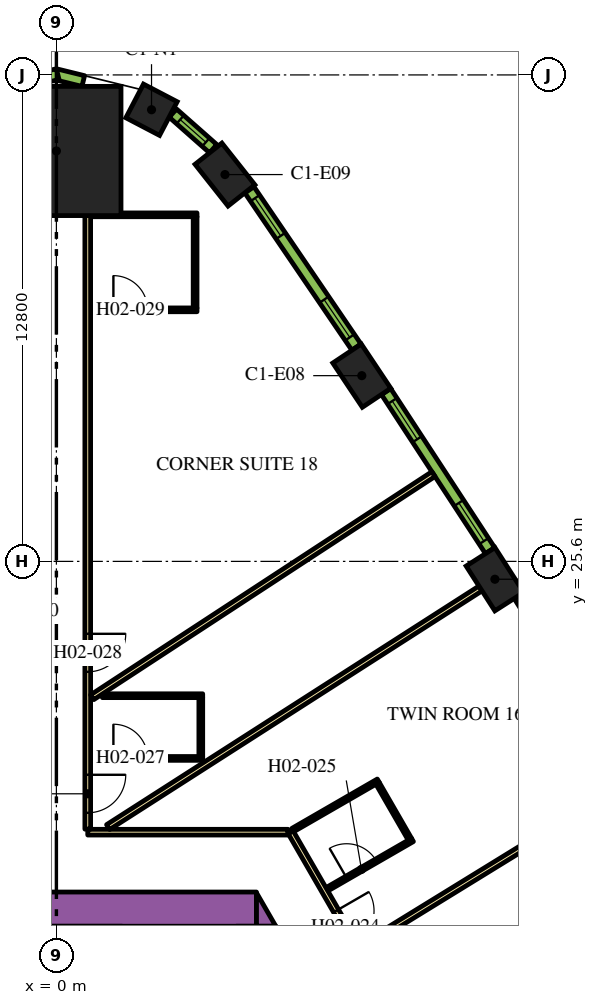
"""IFC4 building model, lengths in metres.
Left out: names, types, materials, properties, quantities, classifications, styles, units other than length and angle.
Written with IfcOpenShell. Run it as: python <this file> out.ifc"""

import sys

from ifc_helpers import new_model, si_unit, direction, frame, frame_2d, origin, origin_2d, place, context, subcontext, project, spatial, polyline, rectangle, outline, extrude, element, fill, save


model = new_model("IFC4")
c1 = context("Model", 3, precision=1e-05, world=origin(), true_north=direction((0.0, 1.0)))
c2 = subcontext(c1, "Body", "Model", "MODEL_VIEW")
j1 = project(units=[si_unit("LENGTHUNIT", "METRE"), si_unit("PLANEANGLEUNIT", "RADIAN")], contexts=[c1])
p1 = place(None, origin())
s1 = spatial("IfcSite", under=j1, at=p1, CompositionType="ELEMENT")
p2 = place(p1, origin())
s2 = spatial("IfcBuilding", under=s1, at=p2, CompositionType="ELEMENT")
p3 = place(p2, frame((0.0, 0.0, 39.3)))
s3 = spatial("IfcBuildingStorey", under=s2, at=p3, CompositionType="ELEMENT", Elevation=39.3)
p4 = place(p3, frame((0.0, 36.399, 0.0), z_axis=(0.0, 0.0, 1.0), x_axis=(0.0, 1.0, 0.0)))
e1 = element("IfcColumn", 1, at=p4, inside=s3, PredefinedType="COLUMN", context=c2, shape_type="SweptSolid", body=[
    extrude(rectangle(XDim=3.4, YDim=3.4, at=origin_2d()), origin(), (0.0, 0.0, 1.0), 3.9),
])
for number, where, z_axis, x_axis in (
    (2, (11.539, 25.131, 0.0), (0.0, 0.0, 1.0), (-0.539, 0.842, 0.0)),
    (3, (8.037, 30.487, 0.0), (0.0, 0.0, 1.0), (-0.555, 0.832, 0.0)),
    (4, (4.436, 35.778, 0.0), (0.0, 0.0, 1.0), (-0.62, 0.784, 0.0)),
):
    element("IfcColumn", number, at=place(p3, frame(where, z_axis=z_axis, x_axis=x_axis)), inside=s3, PredefinedType="COLUMN", context=c2, shape_type="SweptSolid", body=[
        extrude(rectangle(XDim=1.4, YDim=0.9, at=origin_2d()), origin(), (0.0, 0.0, 1.0), 3.9),
    ])
p5 = place(p3, frame((2.503, 37.484, 0.0), z_axis=(0.0, 0.0, 1.0), x_axis=(-0.886067695645, 0.463555863661, 0.0)))
e5 = element("IfcColumn", 5, at=p5, inside=s3, PredefinedType="COLUMN", context=c2, shape_type="SweptSolid", body=[
    extrude(rectangle(XDim=1.0, YDim=1.0, at=origin_2d()), origin(), (0.0, 0.0, 1.0), 3.9),
])
p6 = place(p3, frame((-4.224, 16.45, 0.0), z_axis=(0.0, 0.0, 1.0), x_axis=(1.0, 0.0, 0.0)))
e6 = element("IfcWall", 6, at=p6, inside=s3, PredefinedType="SOLIDWALL", context=c2, shape_type="SweptSolid", body=[
    extrude(rectangle(XDim=9.488, YDim=0.9, at=frame_2d((4.744, 0.0))), origin(), (0.0, 0.0, 1.0), 3.9),
])
p7 = place(p3, origin())
e7 = element("IfcWall", 7, at=p7, inside=s3, PredefinedType="SOLIDWALL", context=c2, shape_type="SweptSolid", body=[
    extrude(outline(polyline([(5.265, 16.0), (5.265, 16.88), (5.773, 16.0), (5.265, 16.0)])), origin(), (0.0, 0.0, 1.0), 3.9),
])
p8 = place(p3, frame((6.163, 18.475, 0.0), z_axis=(0.0, 0.0, 1.0), x_axis=(0.500001317485, -0.866024643133, 0.0)))
e8 = element("IfcWall", 8, at=p8, inside=s3, PredefinedType="PARTITIONING", context=c2, shape_type="SweptSolid", body=[
    extrude(rectangle(XDim=25.767, YDim=0.15, at=frame_2d((12.883, 0.0))), origin(), (0.0, 0.0, 1.0), 2.75),
])
p9 = place(p8, frame((24.586, 0.0, 0.0)))
e9 = element("IfcOpeningElement", 9, at=p9, cuts=e8, PredefinedType="OPENING", context=c2, shape_type="SweptSolid", body=[
    extrude(rectangle(XDim=1.0, YDim=2.1, at=frame_2d((0.5, 1.05))), frame((0.0, 0.085, 0.0), z_axis=(0.0, -1.0, 0.0), x_axis=(1.0, 0.0, 0.0)), (0.0, 0.0, 1.0), 0.17),
])
p10 = place(p8, frame((16.196, 0.0, 0.0)))
e10 = element("IfcOpeningElement", 10, at=p10, cuts=e8, PredefinedType="OPENING", context=c2, shape_type="SweptSolid", body=[
    extrude(rectangle(XDim=1.0, YDim=2.1, at=frame_2d((0.5, 1.05))), frame((0.0, 0.085, 0.0), z_axis=(0.0, -1.0, 0.0), x_axis=(1.0, 0.0, 0.0)), (0.0, 0.0, 1.0), 0.17),
])
p11 = place(p8, frame((14.789, 0.0, 0.0)))
e11 = element("IfcOpeningElement", 11, at=p11, cuts=e8, PredefinedType="OPENING", context=c2, shape_type="SweptSolid", body=[
    extrude(rectangle(XDim=1.1, YDim=2.1, at=frame_2d((0.55, 1.05))), frame((0.0, 0.085, 0.0), z_axis=(0.0, -1.0, 0.0), x_axis=(1.0, 0.0, 0.0)), (0.0, 0.0, 1.0), 0.17),
])
p12 = place(p8, frame((3.698, 0.0, 0.0)))
e12 = element("IfcOpeningElement", 12, at=p12, cuts=e8, PredefinedType="OPENING", context=c2, shape_type="SweptSolid", body=[
    extrude(rectangle(XDim=1.0, YDim=2.1, at=frame_2d((0.5, 1.05))), frame((0.0, 0.085, 0.0), z_axis=(0.0, -1.0, 0.0), x_axis=(1.0, 0.0, 0.0)), (0.0, 0.0, 1.0), 0.17),
])
p13 = place(p8, frame((2.391, 0.0, 0.0)))
e13 = element("IfcOpeningElement", 13, at=p13, cuts=e8, PredefinedType="OPENING", context=c2, shape_type="SweptSolid", body=[
    extrude(rectangle(XDim=1.0, YDim=2.1, at=frame_2d((0.5, 1.05))), frame((0.0, 0.085, 0.0), z_axis=(0.0, -1.0, 0.0), x_axis=(1.0, 0.0, 0.0)), (0.0, 0.0, 1.0), 0.17),
])
p14 = place(p3, frame((0.825, 18.475, 0.0), z_axis=(0.0, 0.0, 1.0), x_axis=(1.0, 0.0, 0.0)))
e14 = element("IfcWall", 14, at=p14, inside=s3, PredefinedType="PARTITIONING", context=c2, shape_type="SweptSolid", body=[
    extrude(rectangle(XDim=5.268, YDim=0.15, at=frame_2d((2.634, 0.0))), origin(), (0.0, 0.0, 1.0), 2.75),
])
p15 = place(p3, frame((0.825, 34.699, 0.0), z_axis=(0.0, 0.0, 1.0), x_axis=(0.0, -1.0, 0.0)))
e15 = element("IfcWall", 15, at=p15, inside=s3, PredefinedType="PARTITIONING", context=c2, shape_type="SweptSolid", body=[
    extrude(rectangle(XDim=16.144, YDim=0.15, at=frame_2d((8.072, 0.0))), origin(), (0.0, 0.0, 1.0), 2.75),
])
p16 = place(p15, frame((14.714, 0.0, 0.0)))
e16 = element("IfcOpeningElement", 16, at=p16, cuts=e15, PredefinedType="OPENING", context=c2, shape_type="SweptSolid", body=[
    extrude(rectangle(XDim=1.0, YDim=2.1, at=frame_2d((0.5, 1.05))), frame((0.0, 0.085, 0.0), z_axis=(0.0, -1.0, 0.0), x_axis=(1.0, 0.0, 0.0)), (0.0, 0.0, 1.0), 0.17),
])
p17 = place(p15, frame((11.005, 0.0, 0.0)))
e17 = element("IfcOpeningElement", 17, at=p17, cuts=e15, PredefinedType="OPENING", context=c2, shape_type="SweptSolid", body=[
    extrude(rectangle(XDim=1.0, YDim=2.1, at=frame_2d((0.5, 1.05))), frame((0.0, 0.085, 0.0), z_axis=(0.0, -1.0, 0.0), x_axis=(1.0, 0.0, 0.0)), (0.0, 0.0, 1.0), 0.17),
])
p18 = place(p3, frame((9.922, 27.896, 0.0), z_axis=(0.0, 0.0, 1.0), x_axis=(-0.836970816595, -0.547247523675, 0.0)))
e18 = element("IfcWall", 18, at=p18, inside=s3, PredefinedType="PARTITIONING", context=c2, shape_type="SweptSolid", body=[
    extrude(rectangle(XDim=10.729, YDim=0.15, at=frame_2d((5.364, 0.0))), origin(), (0.0, 0.0, 1.0), 2.75),
])
p19 = place(p3, frame((11.16, 24.888, 0.0), z_axis=(0.0, 0.0, 1.0), x_axis=(-0.84199813156, -0.539480441211, 0.0)))
e19 = element("IfcWall", 19, at=p19, inside=s3, PredefinedType="PARTITIONING", context=c2, shape_type="SweptSolid", body=[
    extrude(rectangle(XDim=11.638, YDim=0.15, at=frame_2d((5.819, 0.0))), origin(), (0.0, 0.0, 1.0), 2.75),
])
p20 = place(p3, frame((14.558, 19.475, 0.0), z_axis=(0.0, 0.0, 1.0), x_axis=(-0.851829455142, -0.523819223925, 0.0)))
e20 = element("IfcWall", 20, at=p20, inside=s3, PredefinedType="PARTITIONING", context=c2, shape_type="SweptSolid", body=[
    extrude(rectangle(XDim=7.688, YDim=0.15, at=frame_2d((3.844, 0.0))), origin(), (0.0, 0.0, 1.0), 2.75),
])
p21 = place(p3, frame((7.118, 16.971, 0.0), z_axis=(0.0, 0.0, 1.0), x_axis=(0.866021400173, 0.500006934395, 0.0)))
e21 = element("IfcWall", 21, at=p21, inside=s3, PredefinedType="PARTITIONING", context=c2, shape_type="SweptSolid", body=[
    extrude(rectangle(XDim=2.6, YDim=0.1, at=frame_2d((1.3, 0.0))), origin(), (0.0, 0.0, 1.0), 2.75),
])
p22 = place(p21, frame((0.6, 0.0, 0.0)))
e22 = element("IfcOpeningElement", 22, at=p22, cuts=e21, PredefinedType="OPENING", context=c2, shape_type="SweptSolid", body=[
    extrude(rectangle(XDim=0.9, YDim=2.1, at=frame_2d((0.45, 1.05))), frame((0.0, 0.06, 0.0), z_axis=(0.0, -1.0, 0.0), x_axis=(1.0, 0.0, 0.0)), (0.0, 0.0, 1.0), 0.12),
])
p23 = place(p3, frame((9.302, 18.289, 0.0), z_axis=(0.0, 0.0, 1.0), x_axis=(-0.500062241894, 0.865989465428, 0.0)))
e23 = element("IfcWall", 23, at=p23, inside=s3, PredefinedType="PARTITIONING", context=c2, shape_type="SweptSolid", body=[
    extrude(rectangle(XDim=1.7, YDim=0.1, at=frame_2d((0.85, 0.0))), origin(), (0.0, 0.0, 1.0), 2.75),
])
p24 = place(p3, frame((6.218, 18.53, 0.0), z_axis=(0.0, 0.0, 1.0), x_axis=(0.865997922154, 0.500047596559, 0.0)))
e24 = element("IfcWall", 24, at=p24, inside=s3, PredefinedType="PARTITIONING", context=c2, shape_type="SweptSolid", body=[
    extrude(rectangle(XDim=2.6, YDim=0.1, at=frame_2d((1.3, 0.0))), origin(), (0.0, 0.0, 1.0), 2.75),
])
p25 = place(p3, frame((0.9, 20.416, 0.0), z_axis=(0.0, 0.0, 1.0), x_axis=(1.0, 0.0, 0.0)))
e25 = element("IfcWall", 25, at=p25, inside=s3, PredefinedType="PARTITIONING", context=c2, shape_type="SweptSolid", body=[
    extrude(rectangle(XDim=2.95, YDim=0.1, at=frame_2d((1.475, 0.0))), origin(), (0.0, 0.0, 1.0), 2.75),
])
p26 = place(p25, frame((0.6, 0.0, 0.0)))
e26 = element("IfcOpeningElement", 26, at=p26, cuts=e25, PredefinedType="OPENING", context=c2, shape_type="SweptSolid", body=[
    extrude(rectangle(XDim=0.9, YDim=2.1, at=frame_2d((0.45, 1.05))), frame((0.0, 0.06, 0.0), z_axis=(0.0, -1.0, 0.0), x_axis=(1.0, 0.0, 0.0)), (0.0, 0.0, 1.0), 0.12),
])
p27 = place(p3, frame((3.8, 20.466, 0.0), z_axis=(0.0, 0.0, 1.0), x_axis=(0.0, 1.0, 0.0)))
e27 = element("IfcWall", 27, at=p27, inside=s3, PredefinedType="PARTITIONING", context=c2, shape_type="SweptSolid", body=[
    extrude(rectangle(XDim=1.55, YDim=0.1, at=frame_2d((0.775, 0.0))), origin(), (0.0, 0.0, 1.0), 2.75),
])
p28 = place(p3, frame((1.21, 22.066, 0.0), z_axis=(0.0, 0.0, 1.0), x_axis=(1.0, 0.0, 0.0)))
e28 = element("IfcWall", 28, at=p28, inside=s3, PredefinedType="PARTITIONING", context=c2, shape_type="SweptSolid", body=[
    extrude(rectangle(XDim=2.64, YDim=0.1, at=frame_2d((1.32, 0.0))), origin(), (0.0, 0.0, 1.0), 2.75),
])
p29 = place(p3, frame((0.9, 32.219, 0.0), z_axis=(0.0, 0.0, 1.0), x_axis=(1.0, 0.0, 0.0)))
e29 = element("IfcWall", 29, at=p29, inside=s3, PredefinedType="PARTITIONING", context=c2, shape_type="SweptSolid", body=[
    extrude(rectangle(XDim=2.8, YDim=0.1, at=frame_2d((1.4, 0.0))), origin(), (0.0, 0.0, 1.0), 2.75),
])
p30 = place(p29, frame((0.6, 0.0, 0.0)))
e30 = element("IfcOpeningElement", 30, at=p30, cuts=e29, PredefinedType="OPENING", context=c2, shape_type="SweptSolid", body=[
    extrude(rectangle(XDim=0.9, YDim=2.1, at=frame_2d((0.45, 1.05))), frame((0.0, 0.06, 0.0), z_axis=(0.0, -1.0, 0.0), x_axis=(1.0, 0.0, 0.0)), (0.0, 0.0, 1.0), 0.12),
])
p31 = place(p3, frame((3.65, 32.269, 0.0), z_axis=(0.0, 0.0, 1.0), x_axis=(0.0, 1.0, 0.0)))
e31 = element("IfcWall", 31, at=p31, inside=s3, PredefinedType="PARTITIONING", context=c2, shape_type="SweptSolid", body=[
    extrude(rectangle(XDim=2.4, YDim=0.1, at=frame_2d((1.2, 0.0))), origin(), (0.0, 0.0, 1.0), 2.75),
])
p32 = place(p3, frame((0.9, 34.719, 0.0), z_axis=(0.0, 0.0, 1.0), x_axis=(1.0, 0.0, 0.0)))
e32 = element("IfcWall", 32, at=p32, inside=s3, PredefinedType="PARTITIONING", context=c2, shape_type="SweptSolid", body=[
    extrude(rectangle(XDim=2.8, YDim=0.1, at=frame_2d((1.4, 0.0))), origin(), (0.0, 0.0, 1.0), 2.75),
])
p33 = place(p3, frame((14.827, 20.466, 0.0), z_axis=(0.0, 0.0, 1.0), x_axis=(-0.531688286542, 0.846940119462, 0.0)))
e33 = element("IfcWall", 33, at=p33, inside=s3, PredefinedType="SOLIDWALL", context=c2, shape_type="SweptSolid", body=[
    extrude(rectangle(XDim=4.998, YDim=0.29, at=frame_2d((2.499, 0.0))), origin(), (0.0, 0.0, 1.0), 3.65),
])
p34 = place(p33, frame((0.297, 0.0, 0.9)))
e34 = element("IfcOpeningElement", 34, at=p34, cuts=e33, PredefinedType="OPENING", context=c2, shape_type="SweptSolid", body=[
    extrude(rectangle(XDim=1.2, YDim=2.15, at=frame_2d((0.6, 1.075))), frame((0.0, 0.155, 0.0), z_axis=(0.0, -1.0, 0.0), x_axis=(1.0, 0.0, 0.0)), (0.0, 0.0, 1.0), 0.31),
])
p35 = place(p33, frame((3.501, 0.0, 0.9)))
e35 = element("IfcOpeningElement", 35, at=p35, cuts=e33, PredefinedType="OPENING", context=c2, shape_type="SweptSolid", body=[
    extrude(rectangle(XDim=1.2, YDim=2.15, at=frame_2d((0.6, 1.075))), frame((0.0, 0.155, 0.0), z_axis=(0.0, -1.0, 0.0), x_axis=(1.0, 0.0, 0.0)), (0.0, 0.0, 1.0), 0.31),
])
p36 = place(p3, frame((11.411, 25.884, 0.0), z_axis=(0.0, 0.0, 1.0), x_axis=(-0.547204617628, 0.836998868845, 0.0)))
e36 = element("IfcWall", 36, at=p36, inside=s3, PredefinedType="SOLIDWALL", context=c2, shape_type="SweptSolid", body=[
    extrude(rectangle(XDim=4.998, YDim=0.29, at=frame_2d((2.499, 0.0))), origin(), (0.0, 0.0, 1.0), 3.65),
])
p37 = place(p36, frame((0.297, 0.0, 0.9)))
e37 = element("IfcOpeningElement", 37, at=p37, cuts=e36, PredefinedType="OPENING", context=c2, shape_type="SweptSolid", body=[
    extrude(rectangle(XDim=1.2, YDim=2.15, at=frame_2d((0.6, 1.075))), frame((0.0, 0.155, 0.0), z_axis=(0.0, -1.0, 0.0), x_axis=(1.0, 0.0, 0.0)), (0.0, 0.0, 1.0), 0.31),
])
p38 = place(p36, frame((3.501, 0.0, 0.9)))
e38 = element("IfcOpeningElement", 38, at=p38, cuts=e36, PredefinedType="OPENING", context=c2, shape_type="SweptSolid", body=[
    extrude(rectangle(XDim=1.2, YDim=2.15, at=frame_2d((0.6, 1.075))), frame((0.0, 0.155, 0.0), z_axis=(0.0, -1.0, 0.0), x_axis=(1.0, 0.0, 0.0)), (0.0, 0.0, 1.0), 0.31),
])
p39 = place(p3, frame((7.895, 31.238, 0.0), z_axis=(0.0, 0.0, 1.0), x_axis=(-0.562610153679, 0.826722332454, 0.0)))
e39 = element("IfcWall", 39, at=p39, inside=s3, PredefinedType="SOLIDWALL", context=c2, shape_type="SweptSolid", body=[
    extrude(rectangle(XDim=5.006, YDim=0.29, at=frame_2d((2.503, 0.0))), origin(), (0.0, 0.0, 1.0), 3.65),
])
p40 = place(p39, frame((0.31, 0.0, 0.9)))
e40 = element("IfcOpeningElement", 40, at=p40, cuts=e39, PredefinedType="OPENING", context=c2, shape_type="SweptSolid", body=[
    extrude(rectangle(XDim=1.2, YDim=2.15, at=frame_2d((0.6, 1.075))), frame((0.0, 0.155, 0.0), z_axis=(0.0, -1.0, 0.0), x_axis=(1.0, 0.0, 0.0)), (0.0, 0.0, 1.0), 0.31),
])
p41 = place(p39, frame((3.541, 0.0, 0.9)))
e41 = element("IfcOpeningElement", 41, at=p41, cuts=e39, PredefinedType="OPENING", context=c2, shape_type="SweptSolid", body=[
    extrude(rectangle(XDim=1.2, YDim=2.15, at=frame_2d((0.6, 1.075))), frame((0.0, 0.155, 0.0), z_axis=(0.0, -1.0, 0.0), x_axis=(1.0, 0.0, 0.0)), (0.0, 0.0, 1.0), 0.31),
])
p42 = place(p3, frame((4.125, 36.459, 0.0), z_axis=(0.0, 0.0, 1.0), x_axis=(-0.749812680302, 0.661650167731, 0.0)))
e42 = element("IfcWall", 42, at=p42, inside=s3, PredefinedType="SOLIDWALL", context=c2, shape_type="SweptSolid", body=[
    extrude(rectangle(XDim=1.415, YDim=0.29, at=frame_2d((0.708, 0.0))), origin(), (0.0, 0.0, 1.0), 3.65),
])
p43 = place(p42, frame((0.258, 0.0, 0.9)))
e43 = element("IfcOpeningElement", 43, at=p43, cuts=e42, PredefinedType="OPENING", context=c2, shape_type="SweptSolid", body=[
    extrude(rectangle(XDim=0.9, YDim=2.15, at=frame_2d((0.45, 1.075))), frame((0.0, 0.155, 0.0), z_axis=(0.0, -1.0, 0.0), x_axis=(1.0, 0.0, 0.0)), (0.0, 0.0, 1.0), 0.31),
])
for number, where, z_axis, x_axis in (
    (44, (0.707, 38.239, 0.0), (0.0, 0.0, 1.0), (-0.971, 0.238, 0.0)),
    (45, (0.035, 38.421, 0.0), (0.0, 0.0, 1.0), (-0.971, -0.238, 0.0)),
):
    element("IfcWall", number, at=place(p3, frame(where, z_axis=z_axis, x_axis=x_axis)), inside=s3, PredefinedType="SOLIDWALL", context=c2, shape_type="SweptSolid", body=[
        extrude(rectangle(XDim=0.764, YDim=0.29, at=frame_2d((0.382, 0.0))), origin(), (0.0, 0.0, 1.0), 3.65),
    ])
p44 = place(p13, origin())
e46 = element("IfcDoor", 46, at=p44, inside=s3, OperationType="SINGLE_SWING_RIGHT", PredefinedType="DOOR", context=c2, shape_type="SweptSolid", body=[
    extrude(rectangle(XDim=1.0, YDim=2.1, at=frame_2d((0.5, 1.05))), frame((0.0, 0.025, 0.0), z_axis=(0.0, -1.0, 0.0), x_axis=(1.0, 0.0, 0.0)), (0.0, 0.0, 1.0), 0.05),
])
fill(e13, e46)
p45 = place(p22, origin())
e47 = element("IfcDoor", 47, at=p45, inside=s3, OperationType="SINGLE_SWING_LEFT", PredefinedType="DOOR", context=c2, shape_type="SweptSolid", body=[
    extrude(rectangle(XDim=0.9, YDim=2.1, at=frame_2d((0.45, 1.05))), frame((0.0, 0.025, 0.0), z_axis=(0.0, -1.0, 0.0), x_axis=(1.0, 0.0, 0.0)), (0.0, 0.0, 1.0), 0.05),
])
fill(e22, e47)
p46 = place(p16, origin())
e48 = element("IfcDoor", 48, at=p46, inside=s3, OperationType="SINGLE_SWING_RIGHT", PredefinedType="DOOR", context=c2, shape_type="SweptSolid", body=[
    extrude(rectangle(XDim=1.0, YDim=2.1, at=frame_2d((0.5, 1.05))), frame((0.0, 0.025, 0.0), z_axis=(0.0, -1.0, 0.0), x_axis=(1.0, 0.0, 0.0)), (0.0, 0.0, 1.0), 0.05),
])
fill(e16, e48)
p47 = place(p26, origin())
e49 = element("IfcDoor", 49, at=p47, inside=s3, OperationType="SINGLE_SWING_LEFT", PredefinedType="DOOR", context=c2, shape_type="SweptSolid", body=[
    extrude(rectangle(XDim=0.9, YDim=2.1, at=frame_2d((0.45, 1.05))), frame((0.0, 0.025, 0.0), z_axis=(0.0, -1.0, 0.0), x_axis=(1.0, 0.0, 0.0)), (0.0, 0.0, 1.0), 0.05),
])
fill(e26, e49)
p48 = place(p17, origin())
e50 = element("IfcDoor", 50, at=p48, inside=s3, OperationType="SINGLE_SWING_RIGHT", PredefinedType="DOOR", context=c2, shape_type="SweptSolid", body=[
    extrude(rectangle(XDim=1.0, YDim=2.1, at=frame_2d((0.5, 1.05))), frame((0.0, 0.025, 0.0), z_axis=(0.0, -1.0, 0.0), x_axis=(1.0, 0.0, 0.0)), (0.0, 0.0, 1.0), 0.05),
])
fill(e17, e50)
p49 = place(p30, origin())
e51 = element("IfcDoor", 51, at=p49, inside=s3, OperationType="SINGLE_SWING_RIGHT", PredefinedType="DOOR", context=c2, shape_type="SweptSolid", body=[
    extrude(rectangle(XDim=0.9, YDim=2.1, at=frame_2d((0.45, 1.05))), frame((0.0, 0.025, 0.0), z_axis=(0.0, -1.0, 0.0), x_axis=(1.0, 0.0, 0.0)), (0.0, 0.0, 1.0), 0.05),
])
fill(e30, e51)
p50 = place(p37, origin())
e52 = element("IfcWindow", 52, at=p50, inside=s3, PartitioningType="DOUBLE_PANEL_VERTICAL", PredefinedType="WINDOW", context=c2, shape_type="SweptSolid", body=[
    extrude(rectangle(XDim=1.2, YDim=2.15, at=frame_2d((0.6, 1.075))), frame((0.0, 0.015, 0.0), z_axis=(0.0, -1.0, 0.0), x_axis=(1.0, 0.0, 0.0)), (0.0, 0.0, 1.0), 0.06),
])
fill(e37, e52)
p51 = place(p38, origin())
e53 = element("IfcWindow", 53, at=p51, inside=s3, PartitioningType="DOUBLE_PANEL_VERTICAL", PredefinedType="WINDOW", context=c2, shape_type="SweptSolid", body=[
    extrude(rectangle(XDim=1.2, YDim=2.15, at=frame_2d((0.6, 1.075))), frame((0.0, 0.015, 0.0), z_axis=(0.0, -1.0, 0.0), x_axis=(1.0, 0.0, 0.0)), (0.0, 0.0, 1.0), 0.06),
])
fill(e38, e53)
p52 = place(p40, origin())
e54 = element("IfcWindow", 54, at=p52, inside=s3, PartitioningType="DOUBLE_PANEL_VERTICAL", PredefinedType="WINDOW", context=c2, shape_type="SweptSolid", body=[
    extrude(rectangle(XDim=1.2, YDim=2.15, at=frame_2d((0.6, 1.075))), frame((0.0, 0.015, 0.0), z_axis=(0.0, -1.0, 0.0), x_axis=(1.0, 0.0, 0.0)), (0.0, 0.0, 1.0), 0.06),
])
fill(e40, e54)
p53 = place(p41, origin())
e55 = element("IfcWindow", 55, at=p53, inside=s3, PartitioningType="DOUBLE_PANEL_VERTICAL", PredefinedType="WINDOW", context=c2, shape_type="SweptSolid", body=[
    extrude(rectangle(XDim=1.2, YDim=2.15, at=frame_2d((0.6, 1.075))), frame((0.0, 0.015, 0.0), z_axis=(0.0, -1.0, 0.0), x_axis=(1.0, 0.0, 0.0)), (0.0, 0.0, 1.0), 0.06),
])
fill(e41, e55)
p54 = place(p43, origin())
e56 = element("IfcWindow", 56, at=p54, inside=s3, PartitioningType="SINGLE_PANEL", PredefinedType="WINDOW", context=c2, shape_type="SweptSolid", body=[
    extrude(rectangle(XDim=0.9, YDim=2.15, at=frame_2d((0.45, 1.075))), frame((0.0, 0.015, 0.0), z_axis=(0.0, -1.0, 0.0), x_axis=(1.0, 0.0, 0.0)), (0.0, 0.0, 1.0), 0.06),
])
fill(e43, e56)
save(model, sys.argv[1])
